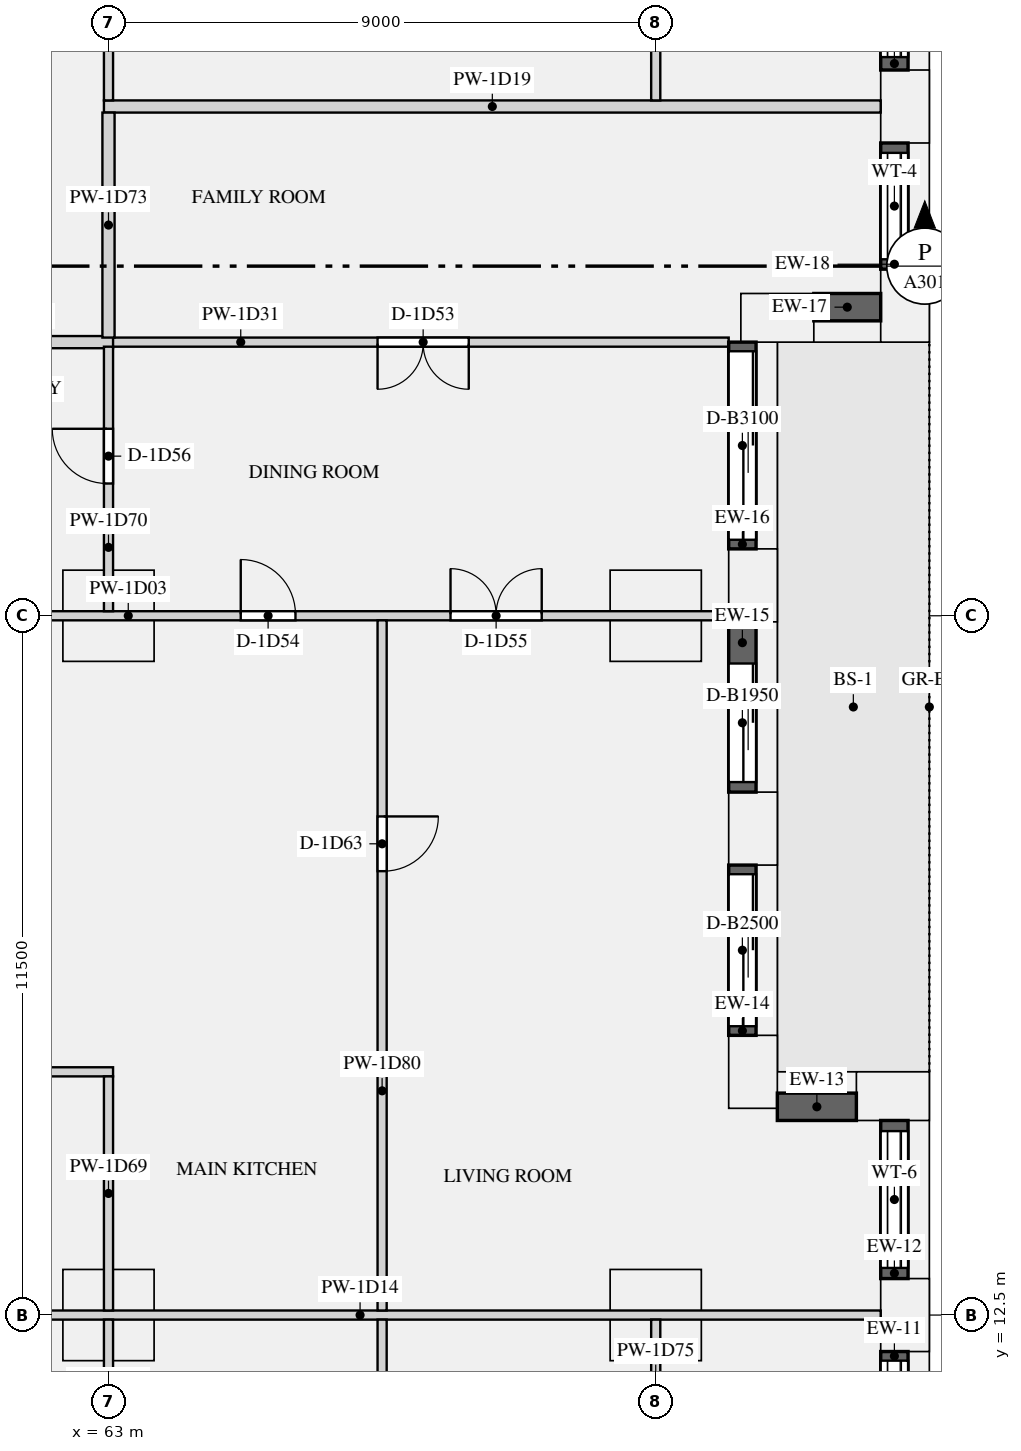
"""IFC4 building model, lengths in metres.
Left out: names, types, materials, properties, quantities, classifications, styles, units other than length and angle.
Written with IfcOpenShell. Run it as: python <this file> out.ifc"""

import sys

from ifc_helpers import new_model, si_unit, direction, frame, frame_2d, origin, origin_2d, place, context, subcontext, project, spatial, rectangle, extrude, element, fill, save


model = new_model("IFC4")
c1 = context("Model", 3, precision=1e-05, world=origin(), true_north=direction((0.0, 1.0)))
c2 = subcontext(c1, "Body", "Model", "MODEL_VIEW")
j1 = project(units=[si_unit("LENGTHUNIT", "METRE"), si_unit("PLANEANGLEUNIT", "RADIAN")], contexts=[c1])
p1 = place(None, origin())
s1 = spatial("IfcSite", under=j1, at=p1, CompositionType="ELEMENT")
p2 = place(p1, origin())
s2 = spatial("IfcBuilding", under=s1, at=p2, CompositionType="ELEMENT")
p3 = place(p2, frame((0.0, 0.0, 47.85)))
s3 = spatial("IfcBuildingStorey", under=s2, at=p3, CompositionType="ELEMENT", Elevation=47.85)
for number, where, z_axis, x_axis in (
    (1, (76.1, 12.5, 0.0), (0.0, 0.0, 1.0), (0.0, 1.0, 0.0)),
    (2, (75.9, 16.1, 0.0), (0.0, 0.0, 1.0), (-1.0, 0.0, 0.0)),
    (3, (73.6, 16.5, 0.0), (0.0, 0.0, 1.0), (0.0, 1.0, 0.0)),
    (4, (73.6, 20.5, 0.0), (0.0, 0.0, 1.0), (0.0, 1.0, 0.0)),
    (5, (73.6, 24.5, 0.0), (0.0, 0.0, 1.0), (0.0, 1.0, 0.0)),
    (6, (74.0, 28.9, 0.0), (0.0, 0.0, 1.0), (1.0, 0.0, 0.0)),
    (7, (76.1, 29.1, 0.0), (0.0, 0.0, 1.0), (0.0, 1.0, 0.0)),
    (8, (76.1, 32.375, 0.0), (0.0, 0.0, 1.0), (0.0, 1.0, 0.0)),
):
    element("IfcColumn", number, at=place(p3, frame(where, z_axis=z_axis, x_axis=x_axis)), inside=s3, PredefinedType="USERDEFINED", context=c2, shape_type="SweptSolid", body=[
        extrude(rectangle(XDim=1.2, YDim=0.8, at=origin_2d()), origin(), (0.0, 0.0, 1.0), 3.15),
    ])
for number, where, z_axis, x_axis in (
    (9, (63.0, 24.0, 0.0), (0.0, 0.0, 1.0), (1.0, 0.0, 0.0)),
    (10, (72.0, 24.0, 0.0), (0.0, 0.0, 1.0), (1.0, 0.0, 0.0)),
    (11, (63.0, 12.5, 0.0), (0.0, 0.0, 1.0), (1.0, 0.0, 0.0)),
    (12, (72.0, 12.5, 0.0), (0.0, 0.0, 1.0), (1.0, 0.0, 0.0)),
):
    element("IfcColumn", number, at=place(p3, frame(where, z_axis=z_axis, x_axis=x_axis)), inside=s3, PredefinedType="COLUMN", context=c2, shape_type="SweptSolid", body=[
        extrude(rectangle(XDim=1.5, YDim=1.5, at=origin_2d()), origin(), (0.0, 0.0, 1.0), 3.15),
    ])
p4 = place(p3, frame((75.925, 9.1, 0.9), z_axis=(0.0, 0.0, 1.0), x_axis=(0.0, 1.0, 0.0)))
e13 = element("IfcWall", 13, at=p4, inside=s3, PredefinedType="SOLIDWALL", context=c2, shape_type="SweptSolid", body=[
    extrude(rectangle(XDim=2.8, YDim=0.45, at=frame_2d((1.4, 0.0))), origin(), (0.0, 0.0, 1.0), 1.93),
])
p5 = place(p4, frame((0.15, 0.0, 0.15)))
e14 = element("IfcOpeningElement", 14, at=p5, cuts=e13, PredefinedType="OPENING", context=c2, shape_type="SweptSolid", body=[
    extrude(rectangle(XDim=2.5, YDim=1.5, at=frame_2d((1.25, 0.75))), frame((0.0, 0.235, 0.0), z_axis=(0.0, -1.0, 0.0), x_axis=(1.0, 0.0, 0.0)), (0.0, 0.0, 1.0), 0.47),
])
p6 = place(p3, frame((75.925, 13.1, 0.9), z_axis=(0.0, 0.0, 1.0), x_axis=(0.0, 1.0, 0.0)))
e15 = element("IfcWall", 15, at=p6, inside=s3, PredefinedType="SOLIDWALL", context=c2, shape_type="SweptSolid", body=[
    extrude(rectangle(XDim=2.6, YDim=0.45, at=frame_2d((1.3, 0.0))), origin(), (0.0, 0.0, 1.0), 1.93),
])
p7 = place(p6, frame((0.175, 0.0, 0.15)))
e16 = element("IfcOpeningElement", 16, at=p7, cuts=e15, PredefinedType="OPENING", context=c2, shape_type="SweptSolid", body=[
    extrude(rectangle(XDim=2.25, YDim=1.5, at=frame_2d((1.125, 0.75))), frame((0.0, 0.235, 0.0), z_axis=(0.0, -1.0, 0.0), x_axis=(1.0, 0.0, 0.0)), (0.0, 0.0, 1.0), 0.47),
])
p8 = place(p3, frame((75.3, 15.925, 0.9), z_axis=(0.0, 0.0, 1.0), x_axis=(-1.0, 0.0, 0.0)))
e17 = element("IfcWall", 17, at=p8, inside=s3, PredefinedType="SOLIDWALL", context=c2, shape_type="SweptSolid", body=[
    extrude(rectangle(XDim=1.3, YDim=0.45, at=frame_2d((0.65, 0.0))), origin(), (0.0, 0.0, 1.0), 1.93),
])
p9 = place(p3, frame((73.425, 17.1, 0.0), z_axis=(0.0, 0.0, 1.0), x_axis=(0.0, 1.0, 0.0)))
e18 = element("IfcWall", 18, at=p9, inside=s3, PredefinedType="SOLIDWALL", context=c2, shape_type="SweptSolid", body=[
    extrude(rectangle(XDim=2.8, YDim=0.45, at=frame_2d((1.4, 0.0))), origin(), (0.0, 0.0, 1.0), 2.83),
])
p10 = place(p9, frame((0.15, 0.0, 0.0)))
e19 = element("IfcOpeningElement", 19, at=p10, cuts=e18, PredefinedType="OPENING", context=c2, shape_type="SweptSolid", body=[
    extrude(rectangle(XDim=2.5, YDim=2.3, at=frame_2d((1.25, 1.15))), frame((0.0, 0.235, 0.0), z_axis=(0.0, -1.0, 0.0), x_axis=(1.0, 0.0, 0.0)), (0.0, 0.0, 1.0), 0.47),
])
p11 = place(p3, frame((73.425, 21.1, 0.0), z_axis=(0.0, 0.0, 1.0), x_axis=(0.0, 1.0, 0.0)))
e20 = element("IfcWall", 20, at=p11, inside=s3, PredefinedType="SOLIDWALL", context=c2, shape_type="SweptSolid", body=[
    extrude(rectangle(XDim=2.8, YDim=0.45, at=frame_2d((1.4, 0.0))), origin(), (0.0, 0.0, 1.0), 2.83),
])
p12 = place(p11, frame((0.165, 0.0, 0.0)))
e21 = element("IfcOpeningElement", 21, at=p12, cuts=e20, PredefinedType="OPENING", context=c2, shape_type="SweptSolid", body=[
    extrude(rectangle(XDim=1.95, YDim=2.3, at=frame_2d((0.975, 1.15))), frame((0.0, 0.235, 0.0), z_axis=(0.0, -1.0, 0.0), x_axis=(1.0, 0.0, 0.0)), (0.0, 0.0, 1.0), 0.47),
])
p13 = place(p3, frame((73.425, 25.1, 0.0), z_axis=(0.0, 0.0, 1.0), x_axis=(0.0, 1.0, 0.0)))
e22 = element("IfcWall", 22, at=p13, inside=s3, PredefinedType="SOLIDWALL", context=c2, shape_type="SweptSolid", body=[
    extrude(rectangle(XDim=3.4, YDim=0.45, at=frame_2d((1.7, 0.0))), origin(), (0.0, 0.0, 1.0), 2.83),
])
p14 = place(p13, frame((0.15, 0.0, 0.0)))
e23 = element("IfcOpeningElement", 23, at=p14, cuts=e22, PredefinedType="OPENING", context=c2, shape_type="SweptSolid", body=[
    extrude(rectangle(XDim=3.1, YDim=2.3, at=frame_2d((1.55, 1.15))), frame((0.0, 0.235, 0.0), z_axis=(0.0, -1.0, 0.0), x_axis=(1.0, 0.0, 0.0)), (0.0, 0.0, 1.0), 0.47),
])
p15 = place(p3, frame((74.6, 29.075, 0.9), z_axis=(0.0, 0.0, 1.0), x_axis=(1.0, 0.0, 0.0)))
e24 = element("IfcWall", 24, at=p15, inside=s3, PredefinedType="SOLIDWALL", context=c2, shape_type="SweptSolid", body=[
    extrude(rectangle(XDim=1.1, YDim=0.45, at=frame_2d((0.55, 0.0))), origin(), (0.0, 0.0, 1.0), 1.93),
])
p16 = place(p3, frame((75.925, 29.7, 0.9), z_axis=(0.0, 0.0, 1.0), x_axis=(0.0, 1.0, 0.0)))
e25 = element("IfcWall", 25, at=p16, inside=s3, PredefinedType="SOLIDWALL", context=c2, shape_type="SweptSolid", body=[
    extrude(rectangle(XDim=2.075, YDim=0.45, at=frame_2d((1.038, 0.0))), origin(), (0.0, 0.0, 1.0), 1.93),
])
p17 = place(p16, frame((0.163, 0.0, 0.15)))
e26 = element("IfcOpeningElement", 26, at=p17, cuts=e25, PredefinedType="OPENING", context=c2, shape_type="SweptSolid", body=[
    extrude(rectangle(XDim=1.75, YDim=1.5, at=frame_2d((0.875, 0.75))), frame((0.0, 0.235, 0.0), z_axis=(0.0, -1.0, 0.0), x_axis=(1.0, 0.0, 0.0)), (0.0, 0.0, 1.0), 0.47),
])
p18 = place(p3, frame((75.925, 32.975, 0.9), z_axis=(0.0, 0.0, 1.0), x_axis=(0.0, 1.0, 0.0)))
e27 = element("IfcWall", 27, at=p18, inside=s3, PredefinedType="SOLIDWALL", context=c2, shape_type="SweptSolid", body=[
    extrude(rectangle(XDim=2.675, YDim=0.45, at=frame_2d((1.337, 0.0))), origin(), (0.0, 0.0, 1.0), 1.93),
])
p19 = place(p18, frame((0.212, 0.0, 0.15)))
e28 = element("IfcOpeningElement", 28, at=p19, cuts=e27, PredefinedType="OPENING", context=c2, shape_type="SweptSolid", body=[
    extrude(rectangle(XDim=2.25, YDim=1.5, at=frame_2d((1.125, 0.75))), frame((0.0, 0.235, 0.0), z_axis=(0.0, -1.0, 0.0), x_axis=(1.0, 0.0, 0.0)), (0.0, 0.0, 1.0), 0.47),
])
p20 = place(p3, frame((59.9, 24.0, 0.0), z_axis=(0.0, 0.0, 1.0), x_axis=(1.0, 0.0, 0.0)))
e29 = element("IfcWall", 29, at=p20, inside=s3, PredefinedType="PARTITIONING", context=c2, shape_type="SweptSolid", body=[
    extrude(rectangle(XDim=13.3, YDim=0.15, at=frame_2d((6.65, 0.0))), origin(), (0.0, 0.0, 1.0), 2.83),
])
p21 = place(p20, frame((5.275, 0.0, 0.0)))
e30 = element("IfcOpeningElement", 30, at=p21, cuts=e29, PredefinedType="OPENING", context=c2, shape_type="SweptSolid", body=[
    extrude(rectangle(XDim=0.9, YDim=2.1, at=frame_2d((0.45, 1.05))), frame((0.0, 0.085, 0.0), z_axis=(0.0, -1.0, 0.0), x_axis=(1.0, 0.0, 0.0)), (0.0, 0.0, 1.0), 0.17),
])
p22 = place(p20, frame((8.725, 0.0, 0.0)))
e31 = element("IfcOpeningElement", 31, at=p22, cuts=e29, PredefinedType="OPENING", context=c2, shape_type="SweptSolid", body=[
    extrude(rectangle(XDim=1.5, YDim=2.1, at=frame_2d((0.75, 1.05))), frame((0.0, 0.085, 0.0), z_axis=(0.0, -1.0, 0.0), x_axis=(1.0, 0.0, 0.0)), (0.0, 0.0, 1.0), 0.17),
])
p23 = place(p20, frame((0.675, 0.0, 0.0)))
e32 = element("IfcOpeningElement", 32, at=p23, cuts=e29, PredefinedType="OPENING", context=c2, shape_type="SweptSolid", body=[
    extrude(rectangle(XDim=0.9, YDim=2.1, at=frame_2d((0.45, 1.05))), frame((0.0, 0.085, 0.0), z_axis=(0.0, -1.0, 0.0), x_axis=(1.0, 0.0, 0.0)), (0.0, 0.0, 1.0), 0.17),
])
p24 = place(p3, frame((58.575, 12.5, 0.0), z_axis=(0.0, 0.0, 1.0), x_axis=(1.0, 0.0, 0.0)))
e33 = element("IfcWall", 33, at=p24, inside=s3, PredefinedType="PARTITIONING", context=c2, shape_type="SweptSolid", body=[
    extrude(rectangle(XDim=17.125, YDim=0.15, at=frame_2d((8.562, 0.0))), origin(), (0.0, 0.0, 1.0), 2.83),
])
p25 = place(p3, frame((58.575, 16.5, 0.0), z_axis=(0.0, 0.0, 1.0), x_axis=(1.0, 0.0, 0.0)))
e34 = element("IfcWall", 34, at=p25, inside=s3, PredefinedType="PARTITIONING", context=c2, shape_type="SweptSolid", body=[
    extrude(rectangle(XDim=4.5, YDim=0.15, at=frame_2d((2.25, 0.0))), origin(), (0.0, 0.0, 1.0), 2.83),
])
p26 = place(p3, frame((62.925, 32.375, 0.0), z_axis=(0.0, 0.0, 1.0), x_axis=(1.0, 0.0, 0.0)))
e35 = element("IfcWall", 35, at=p26, inside=s3, PredefinedType="PARTITIONING", context=c2, shape_type="SweptSolid", body=[
    extrude(rectangle(XDim=12.775, YDim=0.2, at=frame_2d((6.387, 0.0))), origin(), (0.0, 0.0, 1.0), 2.83),
])
p27 = place(p3, frame((62.925, 28.5, 0.0), z_axis=(0.0, 0.0, 1.0), x_axis=(1.0, 0.0, 0.0)))
e36 = element("IfcWall", 36, at=p27, inside=s3, PredefinedType="PARTITIONING", context=c2, shape_type="SweptSolid", body=[
    extrude(rectangle(XDim=10.275, YDim=0.15, at=frame_2d((5.137, 0.0))), origin(), (0.0, 0.0, 1.0), 2.83),
])
p28 = place(p27, frame((4.5, 0.0, 0.0)))
e37 = element("IfcOpeningElement", 37, at=p28, cuts=e36, PredefinedType="OPENING", context=c2, shape_type="SweptSolid", body=[
    extrude(rectangle(XDim=1.5, YDim=2.1, at=frame_2d((0.75, 1.05))), frame((0.0, 0.085, 0.0), z_axis=(0.0, -1.0, 0.0), x_axis=(1.0, 0.0, 0.0)), (0.0, 0.0, 1.0), 0.17),
])
p29 = place(p3, frame((59.8, 28.5, 0.0), z_axis=(0.0, 0.0, 1.0), x_axis=(1.0, 0.0, 0.0)))
e38 = element("IfcWall", 38, at=p29, inside=s3, PredefinedType="PARTITIONING", context=c2, shape_type="SweptSolid", body=[
    extrude(rectangle(XDim=3.275, YDim=0.2, at=frame_2d((1.637, 0.0))), origin(), (0.0, 0.0, 1.0), 2.83),
])
p30 = place(p3, frame((63.0, 9.575, 0.0), z_axis=(0.0, 0.0, 1.0), x_axis=(0.0, 1.0, 0.0)))
e39 = element("IfcWall", 39, at=p30, inside=s3, PredefinedType="PARTITIONING", context=c2, shape_type="SweptSolid", body=[
    extrude(rectangle(XDim=2.85, YDim=0.15, at=frame_2d((1.425, 0.0))), origin(), (0.0, 0.0, 1.0), 2.83),
])
p31 = place(p3, frame((63.0, 12.575, 0.0), z_axis=(0.0, 0.0, 1.0), x_axis=(0.0, 1.0, 0.0)))
e40 = element("IfcWall", 40, at=p31, inside=s3, PredefinedType="PARTITIONING", context=c2, shape_type="SweptSolid", body=[
    extrude(rectangle(XDim=3.85, YDim=0.15, at=frame_2d((1.925, 0.0))), origin(), (0.0, 0.0, 1.0), 2.83),
])
p32 = place(p3, frame((63.0, 24.075, 0.0), z_axis=(0.0, 0.0, 1.0), x_axis=(0.0, 1.0, 0.0)))
e41 = element("IfcWall", 41, at=p32, inside=s3, PredefinedType="PARTITIONING", context=c2, shape_type="SweptSolid", body=[
    extrude(rectangle(XDim=4.35, YDim=0.15, at=frame_2d((2.175, 0.0))), origin(), (0.0, 0.0, 1.0), 2.83),
])
p33 = place(p32, frame((2.1, 0.0, 0.0)))
e42 = element("IfcOpeningElement", 42, at=p33, cuts=e41, PredefinedType="OPENING", context=c2, shape_type="SweptSolid", body=[
    extrude(rectangle(XDim=0.9, YDim=2.1, at=frame_2d((0.45, 1.05))), frame((0.0, 0.085, 0.0), z_axis=(0.0, -1.0, 0.0), x_axis=(1.0, 0.0, 0.0)), (0.0, 0.0, 1.0), 0.17),
])
p34 = place(p3, frame((63.0, 32.475, 0.0), z_axis=(0.0, 0.0, 1.0), x_axis=(0.0, 1.0, 0.0)))
e43 = element("IfcWall", 43, at=p34, inside=s3, PredefinedType="PARTITIONING", context=c2, shape_type="SweptSolid", body=[
    extrude(rectangle(XDim=7.575, YDim=0.15, at=frame_2d((3.788, 0.0))), origin(), (0.0, 0.0, 1.0), 2.83),
])
p35 = place(p3, frame((63.0, 28.575, 0.0), z_axis=(0.0, 0.0, 1.0), x_axis=(0.0, 1.0, 0.0)))
e44 = element("IfcWall", 44, at=p35, inside=s3, PredefinedType="PARTITIONING", context=c2, shape_type="SweptSolid", body=[
    extrude(rectangle(XDim=3.7, YDim=0.2, at=frame_2d((1.85, 0.0))), origin(), (0.0, 0.0, 1.0), 2.83),
])
p36 = place(p3, frame((72.0, 8.575, 0.0), z_axis=(0.0, 0.0, 1.0), x_axis=(0.0, 1.0, 0.0)))
e45 = element("IfcWall", 45, at=p36, inside=s3, PredefinedType="PARTITIONING", context=c2, shape_type="SweptSolid", body=[
    extrude(rectangle(XDim=3.85, YDim=0.15, at=frame_2d((1.925, 0.0))), origin(), (0.0, 0.0, 1.0), 2.83),
])
p37 = place(p36, frame((1.15, 0.0, 0.0)))
e46 = element("IfcOpeningElement", 46, at=p37, cuts=e45, PredefinedType="OPENING", context=c2, shape_type="SweptSolid", body=[
    extrude(rectangle(XDim=0.8, YDim=2.1, at=frame_2d((0.4, 1.05))), frame((0.0, 0.085, 0.0), z_axis=(0.0, -1.0, 0.0), x_axis=(1.0, 0.0, 0.0)), (0.0, 0.0, 1.0), 0.17),
])
p38 = place(p3, frame((72.0, 32.475, 0.0), z_axis=(0.0, 0.0, 1.0), x_axis=(0.0, 1.0, 0.0)))
e47 = element("IfcWall", 47, at=p38, inside=s3, PredefinedType="PARTITIONING", context=c2, shape_type="SweptSolid", body=[
    extrude(rectangle(XDim=7.575, YDim=0.15, at=frame_2d((3.788, 0.0))), origin(), (0.0, 0.0, 1.0), 2.83),
])
p39 = place(p38, frame((4.963, 0.0, 0.0)))
e48 = element("IfcOpeningElement", 48, at=p39, cuts=e47, PredefinedType="OPENING", context=c2, shape_type="SweptSolid", body=[
    extrude(rectangle(XDim=1.5, YDim=2.1, at=frame_2d((0.75, 1.05))), frame((0.0, 0.085, 0.0), z_axis=(0.0, -1.0, 0.0), x_axis=(1.0, 0.0, 0.0)), (0.0, 0.0, 1.0), 0.17),
])
p40 = place(p3, frame((67.5, 0.8, 0.0), z_axis=(0.0, 0.0, 1.0), x_axis=(0.0, 1.0, 0.0)))
e49 = element("IfcWall", 49, at=p40, inside=s3, PredefinedType="PARTITIONING", context=c2, shape_type="SweptSolid", body=[
    extrude(rectangle(XDim=11.625, YDim=0.15, at=frame_2d((5.812, 0.0))), origin(), (0.0, 0.0, 1.0), 2.83),
])
p41 = place(p40, frame((6.25, 0.0, 0.0)))
e50 = element("IfcOpeningElement", 50, at=p41, cuts=e49, PredefinedType="OPENING", context=c2, shape_type="SweptSolid", body=[
    extrude(rectangle(XDim=0.9, YDim=2.1, at=frame_2d((0.45, 1.05))), frame((0.0, 0.085, 0.0), z_axis=(0.0, -1.0, 0.0), x_axis=(1.0, 0.0, 0.0)), (0.0, 0.0, 1.0), 0.17),
])
p42 = place(p3, frame((67.5, 12.575, 0.0), z_axis=(0.0, 0.0, 1.0), x_axis=(0.0, 1.0, 0.0)))
e51 = element("IfcWall", 51, at=p42, inside=s3, PredefinedType="PARTITIONING", context=c2, shape_type="SweptSolid", body=[
    extrude(rectangle(XDim=11.35, YDim=0.15, at=frame_2d((5.675, 0.0))), origin(), (0.0, 0.0, 1.0), 2.83),
])
p43 = place(p42, frame((7.225, 0.0, 0.0)))
e52 = element("IfcOpeningElement", 52, at=p43, cuts=e51, PredefinedType="OPENING", context=c2, shape_type="SweptSolid", body=[
    extrude(rectangle(XDim=0.9, YDim=2.1, at=frame_2d((0.45, 1.05))), frame((0.0, 0.085, 0.0), z_axis=(0.0, -1.0, 0.0), x_axis=(1.0, 0.0, 0.0)), (0.0, 0.0, 1.0), 0.17),
])
p44 = place(p5, origin())
e53 = element("IfcWindow", 53, at=p44, inside=s3, PartitioningType="SINGLE_PANEL", PredefinedType="WINDOW", context=c2, shape_type="SweptSolid", body=[
    extrude(rectangle(XDim=2.5, YDim=1.5, at=frame_2d((1.25, 0.75))), frame((0.0, -0.065, 0.0), z_axis=(0.0, -1.0, 0.0), x_axis=(1.0, 0.0, 0.0)), (0.0, 0.0, 1.0), 0.06),
])
fill(e14, e53)
p45 = place(p7, origin())
e54 = element("IfcWindow", 54, at=p45, inside=s3, PartitioningType="SINGLE_PANEL", PredefinedType="WINDOW", context=c2, shape_type="SweptSolid", body=[
    extrude(rectangle(XDim=2.25, YDim=1.5, at=frame_2d((1.125, 0.75))), frame((0.0, -0.065, 0.0), z_axis=(0.0, -1.0, 0.0), x_axis=(1.0, 0.0, 0.0)), (0.0, 0.0, 1.0), 0.06),
])
fill(e16, e54)
p46 = place(p10, origin())
e55 = element("IfcDoor", 55, at=p46, inside=s3, OperationType="SLIDING_TO_LEFT", PredefinedType="DOOR", context=c2, shape_type="SweptSolid", body=[
    extrude(rectangle(XDim=2.5, YDim=2.3, at=frame_2d((1.25, 1.15))), frame((0.0, -0.07, 0.0), z_axis=(0.0, -1.0, 0.0), x_axis=(1.0, 0.0, 0.0)), (0.0, 0.0, 1.0), 0.05),
])
fill(e19, e55)
p47 = place(p12, origin())
e56 = element("IfcDoor", 56, at=p47, inside=s3, OperationType="SLIDING_TO_LEFT", PredefinedType="DOOR", context=c2, shape_type="SweptSolid", body=[
    extrude(rectangle(XDim=1.95, YDim=2.3, at=frame_2d((0.975, 1.15))), frame((0.0, -0.07, 0.0), z_axis=(0.0, -1.0, 0.0), x_axis=(1.0, 0.0, 0.0)), (0.0, 0.0, 1.0), 0.05),
])
fill(e21, e56)
p48 = place(p14, origin())
e57 = element("IfcDoor", 57, at=p48, inside=s3, OperationType="SLIDING_TO_LEFT", PredefinedType="DOOR", context=c2, shape_type="SweptSolid", body=[
    extrude(rectangle(XDim=3.1, YDim=2.3, at=frame_2d((1.55, 1.15))), frame((0.0, -0.07, 0.0), z_axis=(0.0, -1.0, 0.0), x_axis=(1.0, 0.0, 0.0)), (0.0, 0.0, 1.0), 0.05),
])
fill(e23, e57)
p49 = place(p17, origin())
e58 = element("IfcWindow", 58, at=p49, inside=s3, PartitioningType="SINGLE_PANEL", PredefinedType="WINDOW", context=c2, shape_type="SweptSolid", body=[
    extrude(rectangle(XDim=1.75, YDim=1.5, at=frame_2d((0.875, 0.75))), frame((0.0, -0.065, 0.0), z_axis=(0.0, -1.0, 0.0), x_axis=(1.0, 0.0, 0.0)), (0.0, 0.0, 1.0), 0.06),
])
fill(e26, e58)
p50 = place(p19, origin())
e59 = element("IfcWindow", 59, at=p50, inside=s3, PartitioningType="SINGLE_PANEL", PredefinedType="WINDOW", context=c2, shape_type="SweptSolid", body=[
    extrude(rectangle(XDim=2.25, YDim=1.5, at=frame_2d((1.125, 0.75))), frame((0.0, -0.065, 0.0), z_axis=(0.0, -1.0, 0.0), x_axis=(1.0, 0.0, 0.0)), (0.0, 0.0, 1.0), 0.06),
])
fill(e28, e59)
p51 = place(p28, frame((1.5, 0.0, 0.0), z_axis=(0.0, 0.0, 1.0), x_axis=(-1.0, 0.0, 0.0)))
e60 = element("IfcDoor", 60, at=p51, inside=s3, OperationType="DOUBLE_DOOR_SINGLE_SWING", PredefinedType="DOOR", context=c2, shape_type="SweptSolid", body=[
    extrude(rectangle(XDim=1.5, YDim=2.1, at=frame_2d((0.75, 1.05))), frame((0.0, 0.025, 0.0), z_axis=(0.0, -1.0, 0.0), x_axis=(1.0, 0.0, 0.0)), (0.0, 0.0, 1.0), 0.05),
])
fill(e37, e60)
p52 = place(p21, origin())
e61 = element("IfcDoor", 61, at=p52, inside=s3, OperationType="SINGLE_SWING_LEFT", PredefinedType="DOOR", context=c2, shape_type="SweptSolid", body=[
    extrude(rectangle(XDim=0.9, YDim=2.1, at=frame_2d((0.45, 1.05))), frame((0.0, 0.025, 0.0), z_axis=(0.0, -1.0, 0.0), x_axis=(1.0, 0.0, 0.0)), (0.0, 0.0, 1.0), 0.05),
])
fill(e30, e61)
p53 = place(p22, origin())
e62 = element("IfcDoor", 62, at=p53, inside=s3, OperationType="DOUBLE_DOOR_SINGLE_SWING", PredefinedType="DOOR", context=c2, shape_type="SweptSolid", body=[
    extrude(rectangle(XDim=1.5, YDim=2.1, at=frame_2d((0.75, 1.05))), frame((0.0, 0.025, 0.0), z_axis=(0.0, -1.0, 0.0), x_axis=(1.0, 0.0, 0.0)), (0.0, 0.0, 1.0), 0.05),
])
fill(e31, e62)
p54 = place(p33, origin())
e63 = element("IfcDoor", 63, at=p54, inside=s3, OperationType="SINGLE_SWING_RIGHT", PredefinedType="DOOR", context=c2, shape_type="SweptSolid", body=[
    extrude(rectangle(XDim=0.9, YDim=2.1, at=frame_2d((0.45, 1.05))), frame((0.0, 0.025, 0.0), z_axis=(0.0, -1.0, 0.0), x_axis=(1.0, 0.0, 0.0)), (0.0, 0.0, 1.0), 0.05),
])
fill(e42, e63)
p55 = place(p43, frame((0.9, 0.0, 0.0), z_axis=(0.0, 0.0, 1.0), x_axis=(-1.0, 0.0, 0.0)))
e64 = element("IfcDoor", 64, at=p55, inside=s3, OperationType="SINGLE_SWING_LEFT", PredefinedType="DOOR", context=c2, shape_type="SweptSolid", body=[
    extrude(rectangle(XDim=0.9, YDim=2.1, at=frame_2d((0.45, 1.05))), frame((0.0, 0.025, 0.0), z_axis=(0.0, -1.0, 0.0), x_axis=(1.0, 0.0, 0.0)), (0.0, 0.0, 1.0), 0.05),
])
fill(e52, e64)
save(model, sys.argv[1])
